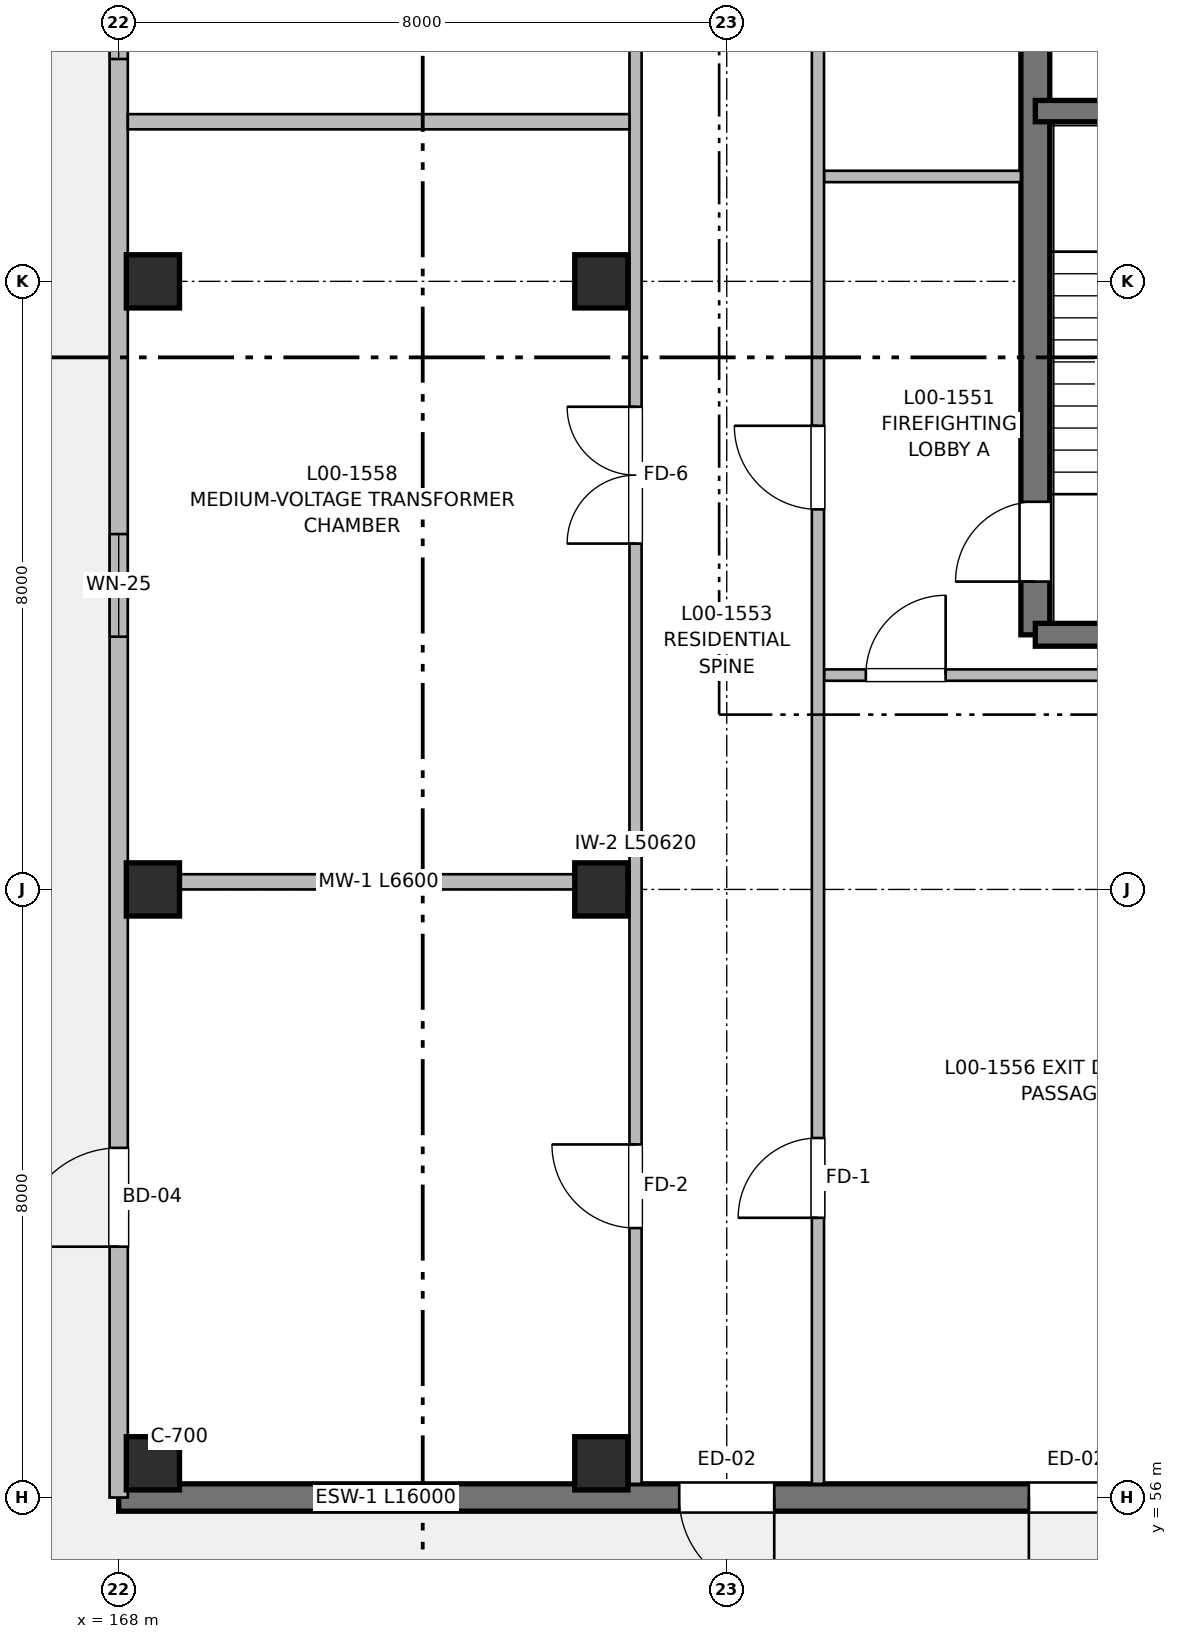
"""IFC4 building model, lengths in metres.
Left out: names, types, materials, properties, quantities, classifications, styles, units other than length and angle.
Written with IfcOpenShell. Run it as: python <this file> out.ifc"""

import sys

from ifc_helpers import new_model, si_unit, direction, frame, frame_2d, origin, origin_2d, place, context, subcontext, project, spatial, rectangle, extrude, element, fill, save


model = new_model("IFC4")
c1 = context("Model", 3, precision=1e-05, world=origin(), true_north=direction((0.0, 1.0)))
c2 = subcontext(c1, "Body", "Model", "MODEL_VIEW")
j1 = project(units=[si_unit("LENGTHUNIT", "METRE"), si_unit("PLANEANGLEUNIT", "RADIAN")], contexts=[c1])
p1 = place(None, origin())
s1 = spatial("IfcSite", under=j1, at=p1, CompositionType="ELEMENT")
p2 = place(p1, origin())
s2 = spatial("IfcBuilding", under=s1, at=p2, CompositionType="ELEMENT")
p3 = place(p2, origin())
s3 = spatial("IfcBuildingStorey", under=s2, at=p3, CompositionType="ELEMENT", Elevation=0.0)
for number, where, z_axis, x_axis in (
    (1, (168.45, 56.45, 0.0), (0.0, 0.0, 1.0), (1.0, 0.0, 0.0)),
    (2, (168.45, 64.0, 0.0), (0.0, 0.0, 1.0), (1.0, 0.0, 0.0)),
    (3, (168.45, 72.0, 0.0), (0.0, 0.0, 1.0), (1.0, 0.0, 0.0)),
    (4, (174.35, 56.45, 0.0), (0.0, 0.0, 1.0), (1.0, 0.0, 0.0)),
    (5, (174.35, 64.0, 0.0), (0.0, 0.0, 1.0), (1.0, 0.0, 0.0)),
    (6, (174.35, 72.0, 0.0), (0.0, 0.0, 1.0), (1.0, 0.0, 0.0)),
):
    element("IfcColumn", number, at=place(p3, frame(where, z_axis=z_axis, x_axis=x_axis)), inside=s3, PredefinedType="COLUMN", context=c2, shape_type="SweptSolid", body=[
        extrude(rectangle(XDim=0.7, YDim=0.7, at=origin_2d()), origin(), (0.0, 0.0, 1.0), 4.16),
    ])
p4 = place(p3, frame((180.06, 67.35, 0.0), z_axis=(0.0, 0.0, 1.0), x_axis=(0.0, 1.0, 0.0)))
e7 = element("IfcWall", 7, at=p4, inside=s3, PredefinedType="SHEAR", context=c2, shape_type="SweptSolid", body=[
    extrude(rectangle(XDim=13.15, YDim=0.38, at=frame_2d((6.575, 0.0))), origin(), (0.0, 0.0, 1.0), 4.16),
])
p5 = place(p4, frame((0.7, 0.0, 0.0)))
e8 = element("IfcOpeningElement", 8, at=p5, cuts=e7, PredefinedType="OPENING", context=c2, shape_type="SweptSolid", body=[
    extrude(rectangle(XDim=1.05, YDim=2.15, at=frame_2d((0.525, 1.075))), frame((0.0, 0.2, 0.0), z_axis=(0.0, -1.0, 0.0), x_axis=(1.0, 0.0, 0.0)), (0.0, 0.0, 1.0), 0.4),
])
p6 = place(p3, frame((183.47, 67.35, 0.0), z_axis=(0.0, 0.0, 1.0), x_axis=(-1.0, 0.0, 0.0)))
e9 = element("IfcWall", 9, at=p6, inside=s3, PredefinedType="SHEAR", context=c2, shape_type="SweptSolid", body=[
    extrude(rectangle(XDim=3.41, YDim=0.3, at=frame_2d((1.705, 0.0))), origin(), (0.0, 0.0, 1.0), 4.16),
])
p7 = place(p3, frame((180.06, 74.24, 0.0), z_axis=(0.0, 0.0, 1.0), x_axis=(1.0, 0.0, 0.0)))
e10 = element("IfcWall", 10, at=p7, inside=s3, PredefinedType="SHEAR", context=c2, shape_type="SweptSolid", body=[
    extrude(rectangle(XDim=3.41, YDim=0.28, at=frame_2d((1.705, 0.0))), origin(), (0.0, 0.0, 1.0), 4.16),
])
p8 = place(p3, frame((184.0, 56.0, 0.0), z_axis=(0.0, 0.0, 1.0), x_axis=(-1.0, 0.0, 0.0)))
e11 = element("IfcWall", 11, at=p8, inside=s3, PredefinedType="SHEAR", context=c2, shape_type="SweptSolid", body=[
    extrude(rectangle(XDim=16.0, YDim=0.36, at=frame_2d((8.0, 0.0))), origin(), (0.0, 0.0, 1.0), 3.94),
])
p9 = place(p8, frame((7.375, 0.0, 0.0)))
e12 = element("IfcOpeningElement", 12, at=p9, cuts=e11, PredefinedType="OPENING", context=c2, shape_type="SweptSolid", body=[
    extrude(rectangle(XDim=1.25, YDim=2.2, at=frame_2d((0.625, 1.1))), frame((0.0, 0.19, 0.0), z_axis=(0.0, -1.0, 0.0), x_axis=(1.0, 0.0, 0.0)), (0.0, 0.0, 1.0), 0.38),
])
p10 = place(p8, frame((2.775, 0.0, 0.0)))
e13 = element("IfcOpeningElement", 13, at=p10, cuts=e11, PredefinedType="OPENING", context=c2, shape_type="SweptSolid", body=[
    extrude(rectangle(XDim=1.25, YDim=2.2, at=frame_2d((0.625, 1.1))), frame((0.0, 0.19, 0.0), z_axis=(0.0, -1.0, 0.0), x_axis=(1.0, 0.0, 0.0)), (0.0, 0.0, 1.0), 0.38),
])
p11 = place(p3, frame((168.0, 56.0, 0.0), z_axis=(0.0, 0.0, 1.0), x_axis=(0.0, 1.0, 0.0)))
e14 = element("IfcWall", 14, at=p11, inside=s3, PredefinedType="SOLIDWALL", context=c2, shape_type="SweptSolid", body=[
    extrude(rectangle(XDim=32.0, YDim=0.24, at=frame_2d((16.0, 0.0))), origin(), (0.0, 0.0, 1.0), 3.94),
])
p12 = place(p11, frame((3.3, 0.0, 0.0)))
e15 = element("IfcOpeningElement", 15, at=p12, cuts=e14, PredefinedType="OPENING", context=c2, shape_type="SweptSolid", body=[
    extrude(rectangle(XDim=1.3, YDim=2.2, at=frame_2d((0.65, 1.1))), frame((0.0, 0.13, 0.0), z_axis=(0.0, -1.0, 0.0), x_axis=(1.0, 0.0, 0.0)), (0.0, 0.0, 1.0), 0.26),
])
p13 = place(p11, frame((11.325, 0.0, 0.95)))
e16 = element("IfcOpeningElement", 16, at=p13, cuts=e14, PredefinedType="OPENING", context=c2, shape_type="SweptSolid", body=[
    extrude(rectangle(XDim=1.35, YDim=1.3, at=frame_2d((0.675, 0.65))), frame((0.0, 0.13, 0.0), z_axis=(0.0, -1.0, 0.0), x_axis=(1.0, 0.0, 0.0)), (0.0, 0.0, 1.0), 0.26),
])
p14 = place(p11, frame((18.925, 0.0, 0.95)))
e17 = element("IfcOpeningElement", 17, at=p14, cuts=e14, PredefinedType="OPENING", context=c2, shape_type="SweptSolid", body=[
    extrude(rectangle(XDim=2.15, YDim=1.8, at=frame_2d((1.075, 0.9))), frame((0.0, 0.13, 0.0), z_axis=(0.0, -1.0, 0.0), x_axis=(1.0, 0.0, 0.0)), (0.0, 0.0, 1.0), 0.26),
])
p15 = place(p11, frame((27.325, 0.0, 0.95)))
e18 = element("IfcOpeningElement", 18, at=p15, cuts=e14, PredefinedType="OPENING", context=c2, shape_type="SweptSolid", body=[
    extrude(rectangle(XDim=1.35, YDim=1.3, at=frame_2d((0.675, 0.65))), frame((0.0, 0.13, 0.0), z_axis=(0.0, -1.0, 0.0), x_axis=(1.0, 0.0, 0.0)), (0.0, 0.0, 1.0), 0.26),
])
p16 = place(p3, frame((177.28, 66.82, 0.0), z_axis=(0.0, 0.0, 1.0), x_axis=(1.0, 0.0, 0.0)))
e19 = element("IfcWall", 19, at=p16, inside=s3, PredefinedType="PARTITIONING", context=c2, shape_type="SweptSolid", body=[
    extrude(rectangle(XDim=6.6, YDim=0.15, at=frame_2d((3.3, 0.0))), origin(), (0.0, 0.0, 1.0), 3.895),
])
p17 = place(p16, frame((0.55, 0.0, 0.0)))
e20 = element("IfcOpeningElement", 20, at=p17, cuts=e19, PredefinedType="OPENING", context=c2, shape_type="SweptSolid", body=[
    extrude(rectangle(XDim=1.05, YDim=2.15, at=frame_2d((0.525, 1.075))), frame((0.0, 0.085, 0.0), z_axis=(0.0, -1.0, 0.0), x_axis=(1.0, 0.0, 0.0)), (0.0, 0.0, 1.0), 0.17),
])
p18 = place(p3, frame((177.28, 73.38, 0.0), z_axis=(0.0, 0.0, 1.0), x_axis=(1.0, 0.0, 0.0)))
e21 = element("IfcWall", 21, at=p18, inside=s3, PredefinedType="PARTITIONING", context=c2, shape_type="SweptSolid", body=[
    extrude(rectangle(XDim=2.59, YDim=0.15, at=frame_2d((1.295, 0.0))), origin(), (0.0, 0.0, 1.0), 3.895),
])
p19 = place(p3, frame((174.8, 56.18, 0.0), z_axis=(0.0, 0.0, 1.0), x_axis=(0.0, 1.0, 0.0)))
e22 = element("IfcWall", 22, at=p19, inside=s3, PredefinedType="PARTITIONING", context=c2, shape_type="SweptSolid", body=[
    extrude(rectangle(XDim=50.62, YDim=0.16, at=frame_2d((25.31, 0.0))), origin(), (0.0, 0.0, 1.0), 3.895),
])
p20 = place(p19, frame((3.365, 0.0, 0.0)))
e23 = element("IfcOpeningElement", 23, at=p20, cuts=e22, PredefinedType="OPENING", context=c2, shape_type="SweptSolid", body=[
    extrude(rectangle(XDim=1.1, YDim=2.15, at=frame_2d((0.55, 1.075))), frame((0.0, 0.09, 0.0), z_axis=(0.0, -1.0, 0.0), x_axis=(1.0, 0.0, 0.0)), (0.0, 0.0, 1.0), 0.18),
])
p21 = place(p19, frame((12.37, 0.0, 0.0)))
e24 = element("IfcOpeningElement", 24, at=p21, cuts=e22, PredefinedType="OPENING", context=c2, shape_type="SweptSolid", body=[
    extrude(rectangle(XDim=1.8, YDim=2.25, at=frame_2d((0.9, 1.125))), frame((0.0, 0.09, 0.0), z_axis=(0.0, -1.0, 0.0), x_axis=(1.0, 0.0, 0.0)), (0.0, 0.0, 1.0), 0.18),
])
p22 = place(p19, frame((22.07, 0.0, 0.0)))
e25 = element("IfcOpeningElement", 25, at=p22, cuts=e22, PredefinedType="OPENING", context=c2, shape_type="SweptSolid", body=[
    extrude(rectangle(XDim=1.0, YDim=2.1, at=frame_2d((0.5, 1.05))), frame((0.0, 0.09, 0.0), z_axis=(0.0, -1.0, 0.0), x_axis=(1.0, 0.0, 0.0)), (0.0, 0.0, 1.0), 0.18),
])
p23 = place(p19, frame((38.025, 0.0, 0.0)))
e26 = element("IfcOpeningElement", 26, at=p23, cuts=e22, PredefinedType="OPENING", context=c2, shape_type="SweptSolid", body=[
    extrude(rectangle(XDim=0.96, YDim=2.15, at=frame_2d((0.48, 1.075))), frame((0.0, 0.09, 0.0), z_axis=(0.0, -1.0, 0.0), x_axis=(1.0, 0.0, 0.0)), (0.0, 0.0, 1.0), 0.18),
])
p24 = place(p3, frame((177.2, 56.18, 0.0), z_axis=(0.0, 0.0, 1.0), x_axis=(0.0, 1.0, 0.0)))
e27 = element("IfcWall", 27, at=p24, inside=s3, PredefinedType="PARTITIONING", context=c2, shape_type="SweptSolid", body=[
    extrude(rectangle(XDim=50.62, YDim=0.16, at=frame_2d((25.31, 0.0))), origin(), (0.0, 0.0, 1.0), 3.895),
])
p25 = place(p24, frame((12.82, 0.0, 0.0)))
e28 = element("IfcOpeningElement", 28, at=p25, cuts=e27, PredefinedType="OPENING", context=c2, shape_type="SweptSolid", body=[
    extrude(rectangle(XDim=1.1, YDim=2.15, at=frame_2d((0.55, 1.075))), frame((0.0, 0.09, 0.0), z_axis=(0.0, -1.0, 0.0), x_axis=(1.0, 0.0, 0.0)), (0.0, 0.0, 1.0), 0.18),
])
p26 = place(p24, frame((19.22, 0.0, 0.0)))
e29 = element("IfcOpeningElement", 29, at=p26, cuts=e27, PredefinedType="OPENING", context=c2, shape_type="SweptSolid", body=[
    extrude(rectangle(XDim=1.6, YDim=2.15, at=frame_2d((0.8, 1.075))), frame((0.0, 0.09, 0.0), z_axis=(0.0, -1.0, 0.0), x_axis=(1.0, 0.0, 0.0)), (0.0, 0.0, 1.0), 0.18),
])
p27 = place(p24, frame((3.5, 0.0, 0.0)))
e30 = element("IfcOpeningElement", 30, at=p27, cuts=e27, PredefinedType="OPENING", context=c2, shape_type="SweptSolid", body=[
    extrude(rectangle(XDim=1.05, YDim=2.15, at=frame_2d((0.525, 1.075))), frame((0.0, 0.09, 0.0), z_axis=(0.0, -1.0, 0.0), x_axis=(1.0, 0.0, 0.0)), (0.0, 0.0, 1.0), 0.18),
])
p28 = place(p24, frame((30.0, 0.0, 0.0)))
e31 = element("IfcOpeningElement", 31, at=p28, cuts=e27, PredefinedType="OPENING", context=c2, shape_type="SweptSolid", body=[
    extrude(rectangle(XDim=1.55, YDim=2.2, at=frame_2d((0.775, 1.1))), frame((0.0, 0.09, 0.0), z_axis=(0.0, -1.0, 0.0), x_axis=(1.0, 0.0, 0.0)), (0.0, 0.0, 1.0), 0.18),
])
p29 = place(p3, frame((168.12, 64.1, 0.0), z_axis=(0.0, 0.0, 1.0), x_axis=(1.0, 0.0, 0.0)))
e32 = element("IfcWall", 32, at=p29, inside=s3, PredefinedType="SOLIDWALL", context=c2, shape_type="SweptSolid", body=[
    extrude(rectangle(XDim=6.6, YDim=0.2, at=frame_2d((3.3, 0.0))), origin(), (0.0, 0.0, 1.0), 3.49),
])
p30 = place(p3, frame((168.12, 74.1, 0.0), z_axis=(0.0, 0.0, 1.0), x_axis=(1.0, 0.0, 0.0)))
e33 = element("IfcWall", 33, at=p30, inside=s3, PredefinedType="SOLIDWALL", context=c2, shape_type="SweptSolid", body=[
    extrude(rectangle(XDim=6.6, YDim=0.2, at=frame_2d((3.3, 0.0))), origin(), (0.0, 0.0, 1.0), 3.895),
])
p31 = place(p5, origin())
e34 = element("IfcDoor", 34, at=p31, inside=s3, OperationType="SINGLE_SWING_LEFT", PredefinedType="DOOR", context=c2, shape_type="SweptSolid", body=[
    extrude(rectangle(XDim=1.05, YDim=2.15, at=frame_2d((0.525, 1.075))), frame((0.0, 0.025, 0.0), z_axis=(0.0, -1.0, 0.0), x_axis=(1.0, 0.0, 0.0)), (0.0, 0.0, 1.0), 0.05),
])
fill(e8, e34)
p32 = place(p9, origin())
e35 = element("IfcDoor", 35, at=p32, inside=s3, OperationType="SINGLE_SWING_LEFT", PredefinedType="DOOR", context=c2, shape_type="SweptSolid", body=[
    extrude(rectangle(XDim=1.25, YDim=2.2, at=frame_2d((0.625, 1.1))), frame((0.0, 0.025, 0.0), z_axis=(0.0, -1.0, 0.0), x_axis=(1.0, 0.0, 0.0)), (0.0, 0.0, 1.0), 0.05),
])
fill(e12, e35)
p33 = place(p10, origin())
e36 = element("IfcDoor", 36, at=p33, inside=s3, OperationType="SINGLE_SWING_RIGHT", PredefinedType="DOOR", context=c2, shape_type="SweptSolid", body=[
    extrude(rectangle(XDim=1.25, YDim=2.2, at=frame_2d((0.625, 1.1))), frame((0.0, 0.025, 0.0), z_axis=(0.0, -1.0, 0.0), x_axis=(1.0, 0.0, 0.0)), (0.0, 0.0, 1.0), 0.05),
])
fill(e13, e36)
p34 = place(p12, origin())
e37 = element("IfcDoor", 37, at=p34, inside=s3, OperationType="SINGLE_SWING_LEFT", PredefinedType="DOOR", context=c2, shape_type="SweptSolid", body=[
    extrude(rectangle(XDim=1.3, YDim=2.2, at=frame_2d((0.65, 1.1))), frame((0.0, 0.025, 0.0), z_axis=(0.0, -1.0, 0.0), x_axis=(1.0, 0.0, 0.0)), (0.0, 0.0, 1.0), 0.05),
])
fill(e15, e37)
p35 = place(p13, origin())
e38 = element("IfcWindow", 38, at=p35, inside=s3, PartitioningType="SINGLE_PANEL", PredefinedType="WINDOW", context=c2, shape_type="SweptSolid", body=[
    extrude(rectangle(XDim=1.35, YDim=1.3, at=frame_2d((0.675, 0.65))), frame((0.0, 0.03, 0.0), z_axis=(0.0, -1.0, 0.0), x_axis=(1.0, 0.0, 0.0)), (0.0, 0.0, 1.0), 0.06),
])
fill(e16, e38)
p36 = place(p14, origin())
e39 = element("IfcWindow", 39, at=p36, inside=s3, PartitioningType="SINGLE_PANEL", PredefinedType="WINDOW", context=c2, shape_type="SweptSolid", body=[
    extrude(rectangle(XDim=2.15, YDim=1.8, at=frame_2d((1.075, 0.9))), frame((0.0, 0.03, 0.0), z_axis=(0.0, -1.0, 0.0), x_axis=(1.0, 0.0, 0.0)), (0.0, 0.0, 1.0), 0.06),
])
fill(e17, e39)
p37 = place(p25, origin())
e40 = element("IfcDoor", 40, at=p37, inside=s3, OperationType="SINGLE_SWING_RIGHT", PredefinedType="DOOR", context=c2, shape_type="SweptSolid", body=[
    extrude(rectangle(XDim=1.1, YDim=2.15, at=frame_2d((0.55, 1.075))), frame((0.0, 0.025, 0.0), z_axis=(0.0, -1.0, 0.0), x_axis=(1.0, 0.0, 0.0)), (0.0, 0.0, 1.0), 0.05),
])
fill(e28, e40)
p38 = place(p17, origin())
e41 = element("IfcDoor", 41, at=p38, inside=s3, OperationType="SINGLE_SWING_RIGHT", PredefinedType="DOOR", context=c2, shape_type="SweptSolid", body=[
    extrude(rectangle(XDim=1.05, YDim=2.15, at=frame_2d((0.525, 1.075))), frame((0.0, 0.025, 0.0), z_axis=(0.0, -1.0, 0.0), x_axis=(1.0, 0.0, 0.0)), (0.0, 0.0, 1.0), 0.05),
])
fill(e20, e41)
p39 = place(p27, origin())
e42 = element("IfcDoor", 42, at=p39, inside=s3, OperationType="SINGLE_SWING_LEFT", PredefinedType="DOOR", context=c2, shape_type="SweptSolid", body=[
    extrude(rectangle(XDim=1.05, YDim=2.15, at=frame_2d((0.525, 1.075))), frame((0.0, 0.025, 0.0), z_axis=(0.0, -1.0, 0.0), x_axis=(1.0, 0.0, 0.0)), (0.0, 0.0, 1.0), 0.05),
])
fill(e30, e42)
p40 = place(p20, origin())
e43 = element("IfcDoor", 43, at=p40, inside=s3, OperationType="SINGLE_SWING_RIGHT", PredefinedType="DOOR", context=c2, shape_type="SweptSolid", body=[
    extrude(rectangle(XDim=1.1, YDim=2.15, at=frame_2d((0.55, 1.075))), frame((0.0, 0.025, 0.0), z_axis=(0.0, -1.0, 0.0), x_axis=(1.0, 0.0, 0.0)), (0.0, 0.0, 1.0), 0.05),
])
fill(e23, e43)
p41 = place(p21, origin())
e44 = element("IfcDoor", 44, at=p41, inside=s3, OperationType="DOUBLE_DOOR_SINGLE_SWING", PredefinedType="DOOR", context=c2, shape_type="SweptSolid", body=[
    extrude(rectangle(XDim=1.8, YDim=2.25, at=frame_2d((0.9, 1.125))), frame((0.0, 0.025, 0.0), z_axis=(0.0, -1.0, 0.0), x_axis=(1.0, 0.0, 0.0)), (0.0, 0.0, 1.0), 0.05),
])
fill(e24, e44)
save(model, sys.argv[1])
